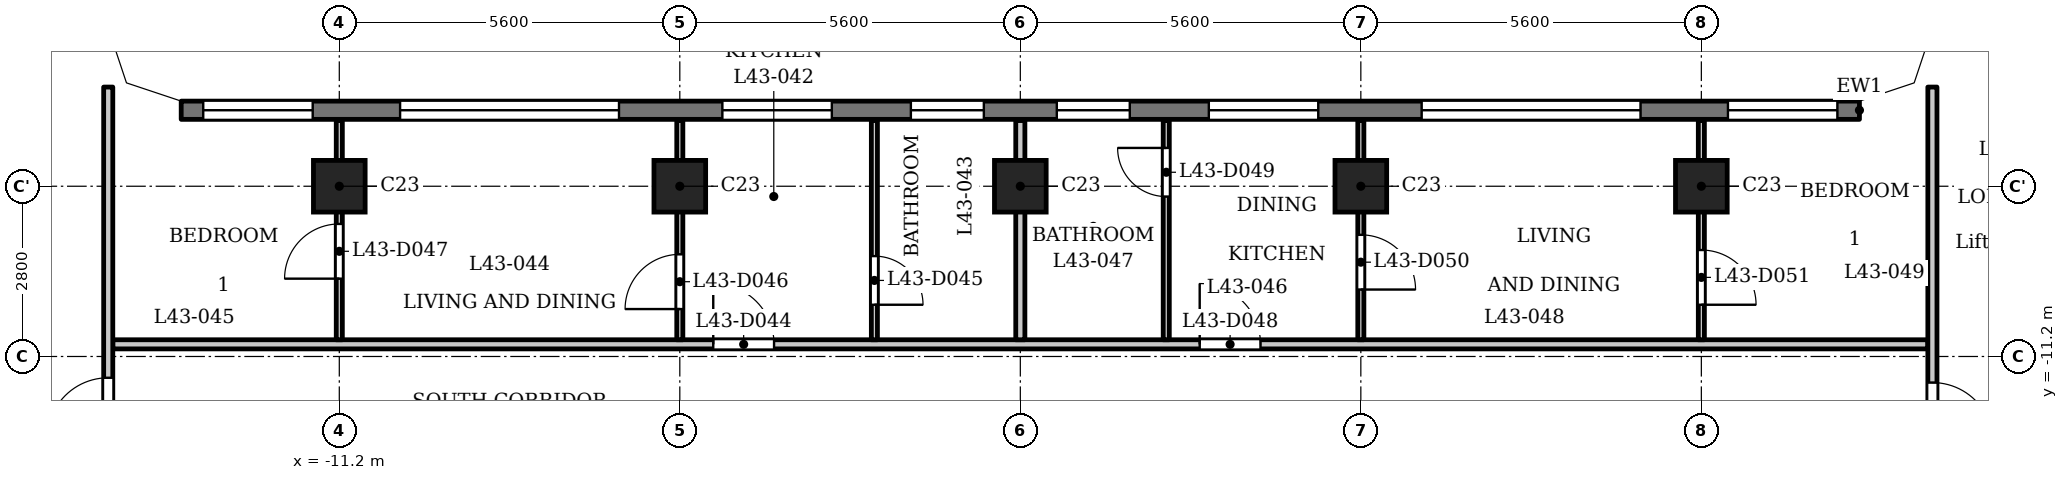
"""IFC4 building model, lengths in metres.
Left out: names, types, materials, properties, quantities, classifications, styles, units other than length and angle.
Written with IfcOpenShell. Run it as: python <this file> out.ifc"""

import sys

from ifc_helpers import new_model, si_unit, direction, frame, frame_2d, origin, origin_2d, place, context, subcontext, project, spatial, polyline, rectangle, outline, extrude, element, fill, save


model = new_model("IFC4")
c1 = context("Model", 3, precision=1e-05, world=origin(), true_north=direction((0.0, 1.0)))
c2 = subcontext(c1, "Body", "Model", "MODEL_VIEW")
j1 = project(units=[si_unit("LENGTHUNIT", "METRE"), si_unit("PLANEANGLEUNIT", "RADIAN")], contexts=[c1])
p1 = place(None, origin())
s1 = spatial("IfcSite", under=j1, at=p1, CompositionType="ELEMENT")
p2 = place(p1, origin())
s2 = spatial("IfcBuilding", under=s1, at=p2, CompositionType="ELEMENT")
p3 = place(p2, frame((0.0, 0.0, 167.6)))
s3 = spatial("IfcBuildingStorey", under=s2, at=p3, CompositionType="ELEMENT", Elevation=167.6)
for number, where, z_axis, x_axis in (
    (1, (-11.2, -8.4, 0.0), (0.0, 0.0, 1.0), (1.0, 0.0, 0.0)),
    (2, (-5.6, -8.4, 0.0), (0.0, 0.0, 1.0), (1.0, 0.0, 0.0)),
    (3, (0.0, -8.4, 0.0), (0.0, 0.0, 1.0), (1.0, 0.0, 0.0)),
    (4, (5.6, -8.4, 0.0), (0.0, 0.0, 1.0), (1.0, 0.0, 0.0)),
    (5, (11.2, -8.4, 0.0), (0.0, 0.0, 1.0), (1.0, 0.0, 0.0)),
):
    element("IfcColumn", number, at=place(p3, frame(where, z_axis=z_axis, x_axis=x_axis)), inside=s3, PredefinedType="COLUMN", context=c2, shape_type="SweptSolid", body=[
        extrude(rectangle(XDim=0.85, YDim=0.85, at=origin_2d()), origin(), (0.0, 0.0, 1.0), 3.5),
    ])
p4 = place(p3, frame((13.8, -7.15, 0.0), z_axis=(0.0, 0.0, 1.0), x_axis=(-1.0, 0.0, 0.0)))
e6 = element("IfcWall", 6, at=p4, inside=s3, PredefinedType="SOLIDWALL", context=c2, shape_type="SweptSolid", body=[
    extrude(rectangle(XDim=27.6, YDim=0.3, at=frame_2d((13.8, 0.0))), origin(), (0.0, 0.0, 1.0), 3.2),
])
p5 = place(p4, frame((0.363, 0.0, 0.9)))
e7 = element("IfcOpeningElement", 7, at=p5, cuts=e6, PredefinedType="OPENING", context=c2, shape_type="SweptSolid", body=[
    extrude(rectangle(XDim=1.8, YDim=1.25, at=frame_2d((0.9, 0.625))), frame((0.0, 0.16, 0.0), z_axis=(0.0, -1.0, 0.0), x_axis=(1.0, 0.0, 0.0)), (0.0, 0.0, 1.0), 0.32),
])
p6 = place(p4, frame((3.6, 0.0, 1.2)))
e8 = element("IfcOpeningElement", 8, at=p6, cuts=e6, PredefinedType="OPENING", context=c2, shape_type="SweptSolid", body=[
    extrude(rectangle(XDim=3.6, YDim=0.95, at=frame_2d((1.8, 0.475))), frame((0.0, 0.16, 0.0), z_axis=(0.0, -1.0, 0.0), x_axis=(1.0, 0.0, 0.0)), (0.0, 0.0, 1.0), 0.32),
])
p7 = place(p4, frame((8.9, 0.0, 0.9)))
e9 = element("IfcOpeningElement", 9, at=p7, cuts=e6, PredefinedType="OPENING", context=c2, shape_type="SweptSolid", body=[
    extrude(rectangle(XDim=1.8, YDim=1.25, at=frame_2d((0.9, 0.625))), frame((0.0, 0.16, 0.0), z_axis=(0.0, -1.0, 0.0), x_axis=(1.0, 0.0, 0.0)), (0.0, 0.0, 1.0), 0.32),
])
p8 = place(p4, frame((12.0, 0.0, 0.6)))
e10 = element("IfcOpeningElement", 10, at=p8, cuts=e6, PredefinedType="OPENING", context=c2, shape_type="SweptSolid", body=[
    extrude(rectangle(XDim=1.2, YDim=1.55, at=frame_2d((0.6, 0.775))), frame((0.0, 0.16, 0.0), z_axis=(0.0, -1.0, 0.0), x_axis=(1.0, 0.0, 0.0)), (0.0, 0.0, 1.0), 0.32),
])
p9 = place(p4, frame((14.4, 0.0, 0.6)))
e11 = element("IfcOpeningElement", 11, at=p9, cuts=e6, PredefinedType="OPENING", context=c2, shape_type="SweptSolid", body=[
    extrude(rectangle(XDim=1.2, YDim=1.55, at=frame_2d((0.6, 0.775))), frame((0.0, 0.16, 0.0), z_axis=(0.0, -1.0, 0.0), x_axis=(1.0, 0.0, 0.0)), (0.0, 0.0, 1.0), 0.32),
])
p10 = place(p4, frame((16.9, 0.0, 0.9)))
e12 = element("IfcOpeningElement", 12, at=p10, cuts=e6, PredefinedType="OPENING", context=c2, shape_type="SweptSolid", body=[
    extrude(rectangle(XDim=1.8, YDim=1.25, at=frame_2d((0.9, 0.625))), frame((0.0, 0.16, 0.0), z_axis=(0.0, -1.0, 0.0), x_axis=(1.0, 0.0, 0.0)), (0.0, 0.0, 1.0), 0.32),
])
p11 = place(p4, frame((20.4, 0.0, 1.2)))
e13 = element("IfcOpeningElement", 13, at=p11, cuts=e6, PredefinedType="OPENING", context=c2, shape_type="SweptSolid", body=[
    extrude(rectangle(XDim=3.6, YDim=0.95, at=frame_2d((1.8, 0.475))), frame((0.0, 0.16, 0.0), z_axis=(0.0, -1.0, 0.0), x_axis=(1.0, 0.0, 0.0)), (0.0, 0.0, 1.0), 0.32),
])
p12 = place(p4, frame((25.438, 0.0, 0.9)))
e14 = element("IfcOpeningElement", 14, at=p12, cuts=e6, PredefinedType="OPENING", context=c2, shape_type="SweptSolid", body=[
    extrude(rectangle(XDim=1.8, YDim=1.25, at=frame_2d((0.9, 0.625))), frame((0.0, 0.16, 0.0), z_axis=(0.0, -1.0, 0.0), x_axis=(1.0, 0.0, 0.0)), (0.0, 0.0, 1.0), 0.32),
])
p13 = place(p3, frame((-14.925, -11.0, 0.0), z_axis=(0.0, 0.0, 1.0), x_axis=(1.0, 0.0, 0.0)))
e15 = element("IfcWall", 15, at=p13, inside=s3, PredefinedType="PARTITIONING", context=c2, shape_type="SweptSolid", body=[
    extrude(rectangle(XDim=29.85, YDim=0.15, at=frame_2d((14.925, 0.0))), origin(), (0.0, 0.0, 1.0), 3.2),
])
p14 = place(p13, frame((9.875, 0.0, 0.0)))
e16 = element("IfcOpeningElement", 16, at=p14, cuts=e15, PredefinedType="OPENING", context=c2, shape_type="SweptSolid", body=[
    extrude(rectangle(XDim=1.0, YDim=2.1, at=frame_2d((0.5, 1.05))), frame((0.0, 0.085, 0.0), z_axis=(0.0, -1.0, 0.0), x_axis=(1.0, 0.0, 0.0)), (0.0, 0.0, 1.0), 0.17),
])
p15 = place(p13, frame((17.875, 0.0, 0.0)))
e17 = element("IfcOpeningElement", 17, at=p15, cuts=e15, PredefinedType="OPENING", context=c2, shape_type="SweptSolid", body=[
    extrude(rectangle(XDim=1.0, YDim=2.1, at=frame_2d((0.5, 1.05))), frame((0.0, 0.085, 0.0), z_axis=(0.0, -1.0, 0.0), x_axis=(1.0, 0.0, 0.0)), (0.0, 0.0, 1.0), 0.17),
])
p16 = place(p3, frame((-15.0, -13.125, 0.0), z_axis=(0.0, 0.0, 1.0), x_axis=(0.0, 1.0, 0.0)))
e18 = element("IfcWall", 18, at=p16, inside=s3, PredefinedType="PARTITIONING", context=c2, shape_type="SweptSolid", body=[
    extrude(rectangle(XDim=6.356, YDim=0.15, at=frame_2d((3.178, 0.0))), origin(), (0.0, 0.0, 1.0), 3.2),
])
p17 = place(p16, frame((0.575, 0.0, 0.0)))
e19 = element("IfcOpeningElement", 19, at=p17, cuts=e18, PredefinedType="OPENING", context=c2, shape_type="SweptSolid", body=[
    extrude(rectangle(XDim=1.0, YDim=2.1, at=frame_2d((0.5, 1.05))), frame((0.0, 0.085, 0.0), z_axis=(0.0, -1.0, 0.0), x_axis=(1.0, 0.0, 0.0)), (0.0, 0.0, 1.0), 0.17),
])
p18 = place(p3, frame((-11.2, -10.925, 0.0), z_axis=(0.0, 0.0, 1.0), x_axis=(0.0, 1.0, 0.0)))
e20 = element("IfcWall", 20, at=p18, inside=s3, PredefinedType="PARTITIONING", context=c2, shape_type="SweptSolid", body=[
    extrude(rectangle(XDim=3.605, YDim=0.1, at=frame_2d((1.802, 0.0))), origin(), (0.0, 0.0, 1.0), 3.2),
])
p19 = place(p18, frame((1.005, 0.0, 0.0)))
e21 = element("IfcOpeningElement", 21, at=p19, cuts=e20, PredefinedType="OPENING", context=c2, shape_type="SweptSolid", body=[
    extrude(rectangle(XDim=0.9, YDim=2.1, at=frame_2d((0.45, 1.05))), frame((0.0, 0.06, 0.0), z_axis=(0.0, -1.0, 0.0), x_axis=(1.0, 0.0, 0.0)), (0.0, 0.0, 1.0), 0.12),
])
p20 = place(p3, frame((-5.6, -10.925, 0.0), z_axis=(0.0, 0.0, 1.0), x_axis=(0.0, 1.0, 0.0)))
e22 = element("IfcWall", 22, at=p20, inside=s3, PredefinedType="PARTITIONING", context=c2, shape_type="SweptSolid", body=[
    extrude(rectangle(XDim=3.605, YDim=0.1, at=frame_2d((1.802, 0.0))), origin(), (0.0, 0.0, 1.0), 3.2),
])
p21 = place(p20, frame((0.505, 0.0, 0.0)))
e23 = element("IfcOpeningElement", 23, at=p21, cuts=e22, PredefinedType="OPENING", context=c2, shape_type="SweptSolid", body=[
    extrude(rectangle(XDim=0.9, YDim=2.1, at=frame_2d((0.45, 1.05))), frame((0.0, 0.06, 0.0), z_axis=(0.0, -1.0, 0.0), x_axis=(1.0, 0.0, 0.0)), (0.0, 0.0, 1.0), 0.12),
])
p22 = place(p3, frame((-2.4, -10.925, 0.0), z_axis=(0.0, 0.0, 1.0), x_axis=(0.0, 1.0, 0.0)))
e24 = element("IfcWall", 24, at=p22, inside=s3, PredefinedType="PARTITIONING", context=c2, shape_type="SweptSolid", body=[
    extrude(rectangle(XDim=3.605, YDim=0.1, at=frame_2d((1.802, 0.0))), origin(), (0.0, 0.0, 1.0), 3.2),
])
p23 = place(p22, frame((0.576, 0.0, 0.0)))
e25 = element("IfcOpeningElement", 25, at=p23, cuts=e24, PredefinedType="OPENING", context=c2, shape_type="SweptSolid", body=[
    extrude(rectangle(XDim=0.8, YDim=2.1, at=frame_2d((0.4, 1.05))), frame((0.0, 0.06, 0.0), z_axis=(0.0, -1.0, 0.0), x_axis=(1.0, 0.0, 0.0)), (0.0, 0.0, 1.0), 0.12),
])
p24 = place(p3, frame((0.0, -10.925, 0.0), z_axis=(0.0, 0.0, 1.0), x_axis=(0.0, 1.0, 0.0)))
e26 = element("IfcWall", 26, at=p24, inside=s3, PredefinedType="PARTITIONING", context=c2, shape_type="SweptSolid", body=[
    extrude(rectangle(XDim=3.605, YDim=0.15, at=frame_2d((1.802, 0.0))), origin(), (0.0, 0.0, 1.0), 3.2),
])
p25 = place(p3, frame((2.4, -10.925, 0.0), z_axis=(0.0, 0.0, 1.0), x_axis=(0.0, 1.0, 0.0)))
e27 = element("IfcWall", 27, at=p25, inside=s3, PredefinedType="PARTITIONING", context=c2, shape_type="SweptSolid", body=[
    extrude(rectangle(XDim=3.605, YDim=0.1, at=frame_2d((1.802, 0.0))), origin(), (0.0, 0.0, 1.0), 3.2),
])
p26 = place(p25, frame((2.355, 0.0, 0.0)))
e28 = element("IfcOpeningElement", 28, at=p26, cuts=e27, PredefinedType="OPENING", context=c2, shape_type="SweptSolid", body=[
    extrude(rectangle(XDim=0.8, YDim=2.1, at=frame_2d((0.4, 1.05))), frame((0.0, 0.06, 0.0), z_axis=(0.0, -1.0, 0.0), x_axis=(1.0, 0.0, 0.0)), (0.0, 0.0, 1.0), 0.12),
])
p27 = place(p3, frame((5.6, -10.925, 0.0), z_axis=(0.0, 0.0, 1.0), x_axis=(0.0, 1.0, 0.0)))
e29 = element("IfcWall", 29, at=p27, inside=s3, PredefinedType="PARTITIONING", context=c2, shape_type="SweptSolid", body=[
    extrude(rectangle(XDim=3.605, YDim=0.1, at=frame_2d((1.802, 0.0))), origin(), (0.0, 0.0, 1.0), 3.2),
])
p28 = place(p27, frame((0.826, 0.0, 0.0)))
e30 = element("IfcOpeningElement", 30, at=p28, cuts=e29, PredefinedType="OPENING", context=c2, shape_type="SweptSolid", body=[
    extrude(rectangle(XDim=0.9, YDim=2.1, at=frame_2d((0.45, 1.05))), frame((0.0, 0.06, 0.0), z_axis=(0.0, -1.0, 0.0), x_axis=(1.0, 0.0, 0.0)), (0.0, 0.0, 1.0), 0.12),
])
p29 = place(p3, frame((11.2, -10.925, 0.0), z_axis=(0.0, 0.0, 1.0), x_axis=(0.0, 1.0, 0.0)))
e31 = element("IfcWall", 31, at=p29, inside=s3, PredefinedType="PARTITIONING", context=c2, shape_type="SweptSolid", body=[
    extrude(rectangle(XDim=3.605, YDim=0.1, at=frame_2d((1.802, 0.0))), origin(), (0.0, 0.0, 1.0), 3.2),
])
p30 = place(p29, frame((0.576, 0.0, 0.0)))
e32 = element("IfcOpeningElement", 32, at=p30, cuts=e31, PredefinedType="OPENING", context=c2, shape_type="SweptSolid", body=[
    extrude(rectangle(XDim=0.9, YDim=2.1, at=frame_2d((0.45, 1.05))), frame((0.0, 0.06, 0.0), z_axis=(0.0, -1.0, 0.0), x_axis=(1.0, 0.0, 0.0)), (0.0, 0.0, 1.0), 0.12),
])
p31 = place(p3, frame((15.0, -13.125, 0.0), z_axis=(0.0, 0.0, 1.0), x_axis=(0.0, 1.0, 0.0)))
e33 = element("IfcWall", 33, at=p31, inside=s3, PredefinedType="PARTITIONING", context=c2, shape_type="SweptSolid", body=[
    extrude(rectangle(XDim=6.356, YDim=0.15, at=frame_2d((3.178, 0.0))), origin(), (0.0, 0.0, 1.0), 3.2),
])
p32 = place(p31, frame((0.496, 0.0, 0.0)))
e34 = element("IfcOpeningElement", 34, at=p32, cuts=e33, PredefinedType="OPENING", context=c2, shape_type="SweptSolid", body=[
    extrude(rectangle(XDim=1.0, YDim=2.1, at=frame_2d((0.5, 1.05))), frame((0.0, 0.085, 0.0), z_axis=(0.0, -1.0, 0.0), x_axis=(1.0, 0.0, 0.0)), (0.0, 0.0, 1.0), 0.17),
])
p33 = place(p3, origin())
e35 = element("IfcWall", 35, at=p33, inside=s3, PredefinedType="SOLIDWALL", context=c2, shape_type="SweptSolid", body=[
    extrude(outline(polyline([(14.937, -6.937), (15.3, -5.849), (15.3, -5.8), (15.0, -5.8), (14.7, -6.7), (13.8, -7.0), (13.8, -7.3), (13.849, -7.3), (14.937, -6.937)])), origin(), (0.0, 0.0, 1.0), 3.2),
])
e36 = element("IfcWall", 36, at=p33, inside=s3, PredefinedType="SOLIDWALL", context=c2, shape_type="SweptSolid", body=[
    extrude(outline(polyline([(-14.937, -6.937), (-13.849, -7.3), (-13.8, -7.3), (-13.8, -7.0), (-14.7, -6.7), (-15.0, -5.8), (-15.3, -5.8), (-15.3, -5.849), (-14.937, -6.937)])), origin(), (0.0, 0.0, 1.0), 3.2),
])
p34 = place(p17, origin())
e37 = element("IfcDoor", 37, at=p34, inside=s3, OperationType="SINGLE_SWING_RIGHT", PredefinedType="DOOR", context=c2, shape_type="SweptSolid", body=[
    extrude(rectangle(XDim=1.0, YDim=2.1, at=frame_2d((0.5, 1.05))), frame((0.0, 0.025, 0.0), z_axis=(0.0, -1.0, 0.0), x_axis=(1.0, 0.0, 0.0)), (0.0, 0.0, 1.0), 0.05),
])
fill(e19, e37)
p35 = place(p32, origin())
e38 = element("IfcDoor", 38, at=p35, inside=s3, OperationType="SINGLE_SWING_LEFT", PredefinedType="DOOR", context=c2, shape_type="SweptSolid", body=[
    extrude(rectangle(XDim=1.0, YDim=2.1, at=frame_2d((0.5, 1.05))), frame((0.0, 0.025, 0.0), z_axis=(0.0, -1.0, 0.0), x_axis=(1.0, 0.0, 0.0)), (0.0, 0.0, 1.0), 0.05),
])
fill(e34, e38)
p36 = place(p14, origin())
e39 = element("IfcDoor", 39, at=p36, inside=s3, OperationType="SINGLE_SWING_RIGHT", PredefinedType="DOOR", context=c2, shape_type="SweptSolid", body=[
    extrude(rectangle(XDim=1.0, YDim=2.1, at=frame_2d((0.5, 1.05))), frame((0.0, 0.025, 0.0), z_axis=(0.0, -1.0, 0.0), x_axis=(1.0, 0.0, 0.0)), (0.0, 0.0, 1.0), 0.05),
])
fill(e16, e39)
p37 = place(p23, origin())
e40 = element("IfcDoor", 40, at=p37, inside=s3, OperationType="SINGLE_SWING_LEFT", PredefinedType="DOOR", context=c2, shape_type="SweptSolid", body=[
    extrude(rectangle(XDim=0.8, YDim=2.1, at=frame_2d((0.4, 1.05))), frame((0.0, 0.025, 0.0), z_axis=(0.0, -1.0, 0.0), x_axis=(1.0, 0.0, 0.0)), (0.0, 0.0, 1.0), 0.05),
])
fill(e25, e40)
p38 = place(p21, origin())
e41 = element("IfcDoor", 41, at=p38, inside=s3, OperationType="SINGLE_SWING_RIGHT", PredefinedType="DOOR", context=c2, shape_type="SweptSolid", body=[
    extrude(rectangle(XDim=0.9, YDim=2.1, at=frame_2d((0.45, 1.05))), frame((0.0, 0.025, 0.0), z_axis=(0.0, -1.0, 0.0), x_axis=(1.0, 0.0, 0.0)), (0.0, 0.0, 1.0), 0.05),
])
fill(e23, e41)
p39 = place(p19, origin())
e42 = element("IfcDoor", 42, at=p39, inside=s3, OperationType="SINGLE_SWING_RIGHT", PredefinedType="DOOR", context=c2, shape_type="SweptSolid", body=[
    extrude(rectangle(XDim=0.9, YDim=2.1, at=frame_2d((0.45, 1.05))), frame((0.0, 0.025, 0.0), z_axis=(0.0, -1.0, 0.0), x_axis=(1.0, 0.0, 0.0)), (0.0, 0.0, 1.0), 0.05),
])
fill(e21, e42)
p40 = place(p15, origin())
e43 = element("IfcDoor", 43, at=p40, inside=s3, OperationType="SINGLE_SWING_RIGHT", PredefinedType="DOOR", context=c2, shape_type="SweptSolid", body=[
    extrude(rectangle(XDim=1.0, YDim=2.1, at=frame_2d((0.5, 1.05))), frame((0.0, 0.025, 0.0), z_axis=(0.0, -1.0, 0.0), x_axis=(1.0, 0.0, 0.0)), (0.0, 0.0, 1.0), 0.05),
])
fill(e17, e43)
p41 = place(p26, origin())
e44 = element("IfcDoor", 44, at=p41, inside=s3, OperationType="SINGLE_SWING_LEFT", PredefinedType="DOOR", context=c2, shape_type="SweptSolid", body=[
    extrude(rectangle(XDim=0.8, YDim=2.1, at=frame_2d((0.4, 1.05))), frame((0.0, 0.025, 0.0), z_axis=(0.0, -1.0, 0.0), x_axis=(1.0, 0.0, 0.0)), (0.0, 0.0, 1.0), 0.05),
])
fill(e28, e44)
p42 = place(p28, origin())
e45 = element("IfcDoor", 45, at=p42, inside=s3, OperationType="SINGLE_SWING_LEFT", PredefinedType="DOOR", context=c2, shape_type="SweptSolid", body=[
    extrude(rectangle(XDim=0.9, YDim=2.1, at=frame_2d((0.45, 1.05))), frame((0.0, 0.025, 0.0), z_axis=(0.0, -1.0, 0.0), x_axis=(1.0, 0.0, 0.0)), (0.0, 0.0, 1.0), 0.05),
])
fill(e30, e45)
p43 = place(p30, origin())
e46 = element("IfcDoor", 46, at=p43, inside=s3, OperationType="SINGLE_SWING_LEFT", PredefinedType="DOOR", context=c2, shape_type="SweptSolid", body=[
    extrude(rectangle(XDim=0.9, YDim=2.1, at=frame_2d((0.45, 1.05))), frame((0.0, 0.025, 0.0), z_axis=(0.0, -1.0, 0.0), x_axis=(1.0, 0.0, 0.0)), (0.0, 0.0, 1.0), 0.05),
])
fill(e32, e46)
p44 = place(p5, origin())
e47 = element("IfcWindow", 47, at=p44, inside=s3, PartitioningType="SINGLE_PANEL", PredefinedType="WINDOW", context=c2, shape_type="SweptSolid", body=[
    extrude(rectangle(XDim=1.8, YDim=1.25, at=frame_2d((0.9, 0.625))), frame((0.0, 0.03, 0.0), z_axis=(0.0, -1.0, 0.0), x_axis=(1.0, 0.0, 0.0)), (0.0, 0.0, 1.0), 0.06),
])
fill(e7, e47)
p45 = place(p6, origin())
e48 = element("IfcWindow", 48, at=p45, inside=s3, PartitioningType="SINGLE_PANEL", PredefinedType="WINDOW", context=c2, shape_type="SweptSolid", body=[
    extrude(rectangle(XDim=3.6, YDim=0.95, at=frame_2d((1.8, 0.475))), frame((0.0, 0.03, 0.0), z_axis=(0.0, -1.0, 0.0), x_axis=(1.0, 0.0, 0.0)), (0.0, 0.0, 1.0), 0.06),
])
fill(e8, e48)
p46 = place(p7, origin())
e49 = element("IfcWindow", 49, at=p46, inside=s3, PartitioningType="SINGLE_PANEL", PredefinedType="WINDOW", context=c2, shape_type="SweptSolid", body=[
    extrude(rectangle(XDim=1.8, YDim=1.25, at=frame_2d((0.9, 0.625))), frame((0.0, 0.03, 0.0), z_axis=(0.0, -1.0, 0.0), x_axis=(1.0, 0.0, 0.0)), (0.0, 0.0, 1.0), 0.06),
])
fill(e9, e49)
p47 = place(p8, origin())
e50 = element("IfcWindow", 50, at=p47, inside=s3, PartitioningType="SINGLE_PANEL", PredefinedType="WINDOW", context=c2, shape_type="SweptSolid", body=[
    extrude(rectangle(XDim=1.2, YDim=1.55, at=frame_2d((0.6, 0.775))), frame((0.0, 0.03, 0.0), z_axis=(0.0, -1.0, 0.0), x_axis=(1.0, 0.0, 0.0)), (0.0, 0.0, 1.0), 0.06),
])
fill(e10, e50)
p48 = place(p9, origin())
e51 = element("IfcWindow", 51, at=p48, inside=s3, PartitioningType="SINGLE_PANEL", PredefinedType="WINDOW", context=c2, shape_type="SweptSolid", body=[
    extrude(rectangle(XDim=1.2, YDim=1.55, at=frame_2d((0.6, 0.775))), frame((0.0, 0.03, 0.0), z_axis=(0.0, -1.0, 0.0), x_axis=(1.0, 0.0, 0.0)), (0.0, 0.0, 1.0), 0.06),
])
fill(e11, e51)
p49 = place(p10, origin())
e52 = element("IfcWindow", 52, at=p49, inside=s3, PartitioningType="SINGLE_PANEL", PredefinedType="WINDOW", context=c2, shape_type="SweptSolid", body=[
    extrude(rectangle(XDim=1.8, YDim=1.25, at=frame_2d((0.9, 0.625))), frame((0.0, 0.03, 0.0), z_axis=(0.0, -1.0, 0.0), x_axis=(1.0, 0.0, 0.0)), (0.0, 0.0, 1.0), 0.06),
])
fill(e12, e52)
p50 = place(p11, origin())
e53 = element("IfcWindow", 53, at=p50, inside=s3, PartitioningType="SINGLE_PANEL", PredefinedType="WINDOW", context=c2, shape_type="SweptSolid", body=[
    extrude(rectangle(XDim=3.6, YDim=0.95, at=frame_2d((1.8, 0.475))), frame((0.0, 0.03, 0.0), z_axis=(0.0, -1.0, 0.0), x_axis=(1.0, 0.0, 0.0)), (0.0, 0.0, 1.0), 0.06),
])
fill(e13, e53)
p51 = place(p12, origin())
e54 = element("IfcWindow", 54, at=p51, inside=s3, PartitioningType="SINGLE_PANEL", PredefinedType="WINDOW", context=c2, shape_type="SweptSolid", body=[
    extrude(rectangle(XDim=1.8, YDim=1.25, at=frame_2d((0.9, 0.625))), frame((0.0, 0.03, 0.0), z_axis=(0.0, -1.0, 0.0), x_axis=(1.0, 0.0, 0.0)), (0.0, 0.0, 1.0), 0.06),
])
fill(e14, e54)
save(model, sys.argv[1])
